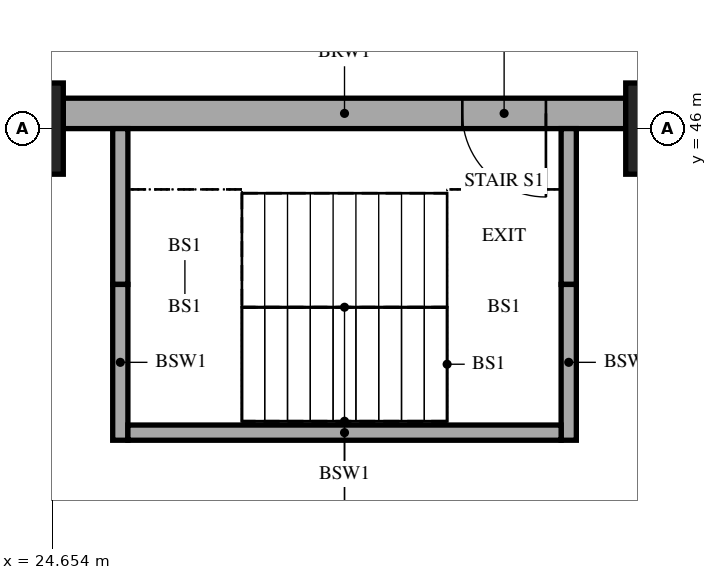
"""IFC4 building model, lengths in metres.
Left out: names, types, materials, properties, quantities, classifications, styles, units other than length and angle.
Written with IfcOpenShell. Run it as: python <this file> out.ifc"""

import sys

from ifc_helpers import new_model, si_unit, direction, frame, frame_2d, origin, origin_2d, place, context, subcontext, project, spatial, rectangle, extrude, element, fill, save


model = new_model("IFC4")
c1 = context("Model", 3, precision=1e-05, world=origin(), true_north=direction((0.0, 1.0)))
c2 = subcontext(c1, "Body", "Model", "MODEL_VIEW")
j1 = project(units=[si_unit("LENGTHUNIT", "METRE"), si_unit("PLANEANGLEUNIT", "RADIAN")], contexts=[c1])
p1 = place(None, origin())
s1 = spatial("IfcSite", under=j1, at=p1, CompositionType="ELEMENT")
p2 = place(p1, origin())
s2 = spatial("IfcBuilding", under=s1, at=p2, CompositionType="ELEMENT")
p3 = place(p2, frame((0.0, 0.0, -4.2)))
s3 = spatial("IfcBuildingStorey", under=s2, at=p3, CompositionType="ELEMENT", Elevation=-4.2)
for number, where, z_axis, x_axis in (
    (1, (24.0, 46.0, 0.0), (0.0, 0.0, 1.0), (1.0, 0.0, 0.0)),
    (2, (33.0, 46.0, 0.0), (0.0, 0.0, 1.0), (1.0, 0.0, 0.0)),
):
    element("IfcColumn", number, at=place(p3, frame(where, z_axis=z_axis, x_axis=x_axis)), inside=s3, PredefinedType="COLUMN", context=c2, shape_type="SweptSolid", body=[
        extrude(rectangle(XDim=1.6, YDim=1.2, at=origin_2d()), origin(), (0.0, 0.0, 1.0), 4.2),
    ])
p4 = place(p3, frame((24.8, 46.2, 0.0), z_axis=(0.0, 0.0, 1.0), x_axis=(1.0, 0.0, 0.0)))
e3 = element("IfcWall", 3, at=p4, inside=s3, PredefinedType="SOLIDWALL", context=c2, shape_type="SweptSolid", body=[
    extrude(rectangle(XDim=7.4, YDim=0.4, at=frame_2d((3.7, 0.0))), origin(), (0.0, 0.0, 1.0), 4.2),
])
p5 = place(p4, frame((5.25, 0.0, 0.0)))
e4 = element("IfcOpeningElement", 4, at=p5, cuts=e3, PredefinedType="OPENING", context=c2, shape_type="SweptSolid", body=[
    extrude(rectangle(XDim=1.1, YDim=2.1, at=frame_2d((0.55, 1.05))), frame((0.0, 0.21, 0.0), z_axis=(0.0, -1.0, 0.0), x_axis=(1.0, 0.0, 0.0)), (0.0, 0.0, 1.0), 0.42),
])
for number, where, z_axis, x_axis in (
    (5, (25.55, 46.0, 0.0), (0.0, 0.0, 1.0), (0.0, -1.0, 0.0)),
    (6, (25.55, 43.95, 0.0), (0.0, 0.0, 1.0), (0.0, -1.0, 0.0)),
    (7, (31.45, 46.0, 0.0), (0.0, 0.0, 1.0), (0.0, -1.0, 0.0)),
    (8, (31.45, 43.95, 0.0), (0.0, 0.0, 1.0), (0.0, -1.0, 0.0)),
):
    element("IfcWall", number, at=place(p3, frame(where, z_axis=z_axis, x_axis=x_axis)), inside=s3, PredefinedType="SOLIDWALL", context=c2, shape_type="SweptSolid", body=[
        extrude(rectangle(XDim=2.05, YDim=0.2, at=frame_2d((1.025, 0.0))), origin(), (0.0, 0.0, 1.0), 4.2),
    ])
p6 = place(p3, frame((25.65, 42.0, 0.0), z_axis=(0.0, 0.0, 1.0), x_axis=(1.0, 0.0, 0.0)))
e9 = element("IfcWall", 9, at=p6, inside=s3, PredefinedType="SOLIDWALL", context=c2, shape_type="SweptSolid", body=[
    extrude(rectangle(XDim=5.7, YDim=0.2, at=frame_2d((2.85, 0.0))), origin(), (0.0, 0.0, 1.0), 4.2),
])
p7 = place(p5, frame((1.1, 0.0, 0.0), z_axis=(0.0, 0.0, 1.0), x_axis=(-1.0, 0.0, 0.0)))
e10 = element("IfcDoor", 10, at=p7, inside=s3, OperationType="SINGLE_SWING_LEFT", PredefinedType="DOOR", context=c2, shape_type="SweptSolid", body=[
    extrude(rectangle(XDim=1.1, YDim=2.1, at=frame_2d((0.55, 1.05))), frame((0.0, 0.025, 0.0), z_axis=(0.0, -1.0, 0.0), x_axis=(1.0, 0.0, 0.0)), (0.0, 0.0, 1.0), 0.05),
])
fill(e4, e10)
save(model, sys.argv[1])
